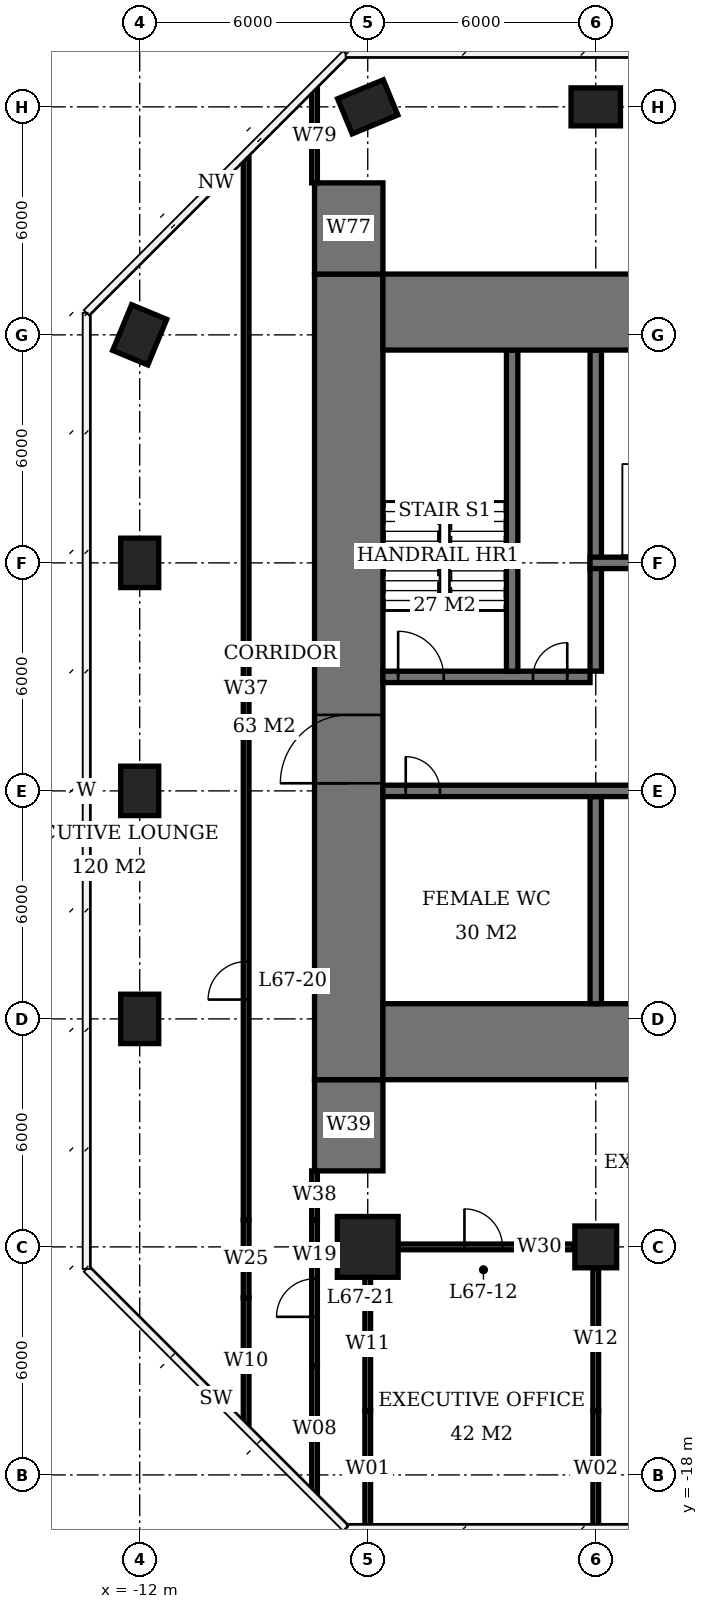
"""IFC4 building model, lengths in metres.
Left out: names, types, materials, properties, quantities, classifications, styles, units other than length and angle.
Written with IfcOpenShell. Run it as: python <this file> out.ifc"""

import sys

from ifc_helpers import new_model, si_unit, direction, frame, frame_2d, origin, origin_2d, place, context, subcontext, project, spatial, rectangle, extrude, element, fill, save


model = new_model("IFC4")
c1 = context("Model", 3, precision=1e-05, world=origin(), true_north=direction((0.0, 1.0)))
c2 = subcontext(c1, "Body", "Model", "MODEL_VIEW")
j1 = project(units=[si_unit("LENGTHUNIT", "METRE"), si_unit("PLANEANGLEUNIT", "RADIAN")], contexts=[c1])
p1 = place(None, origin())
s1 = spatial("IfcSite", under=j1, at=p1, CompositionType="ELEMENT")
p2 = place(p1, origin())
s2 = spatial("IfcBuilding", under=s1, at=p2, CompositionType="ELEMENT")
p3 = place(p2, frame((0.0, 0.0, 272.3)))
s3 = spatial("IfcBuildingStorey", under=s2, at=p3, CompositionType="ELEMENT", Elevation=272.3)
for number, where, z_axis, x_axis in (
    (1, (-12.0, -6.0, 0.0), (0.0, 0.0, 1.0), (0.0, 1.0, 0.0)),
    (2, (-12.0, 0.0, 0.0), (0.0, 0.0, 1.0), (0.0, 1.0, 0.0)),
    (3, (-12.0, 6.0, 0.0), (0.0, 0.0, 1.0), (0.0, 1.0, 0.0)),
    (4, (-12.0, 12.0, 0.0), (0.0, 0.0, 1.0), (0.383, 0.924, 0.0)),
):
    element("IfcColumn", number, at=place(p3, frame(where, z_axis=z_axis, x_axis=x_axis)), inside=s3, PredefinedType="COLUMN", context=c2, shape_type="SweptSolid", body=[
        extrude(rectangle(XDim=1.3, YDim=1.0, at=origin_2d()), origin(), (0.0, 0.0, 1.0), 3.9),
    ])
p4 = place(p3, frame((-6.0, -12.0, 0.0), z_axis=(0.0, 0.0, 1.0), x_axis=(1.0, 0.0, 0.0)))
e5 = element("IfcColumn", 5, at=p4, inside=s3, PredefinedType="COLUMN", context=c2, shape_type="SweptSolid", body=[
    extrude(rectangle(XDim=1.6, YDim=1.6, at=origin_2d()), origin(), (0.0, 0.0, 1.0), 3.9),
])
p5 = place(p3, frame((-6.0, 18.0, 0.0), z_axis=(0.0, 0.0, 1.0), x_axis=(0.923879532511, 0.382683432365, 0.0)))
e6 = element("IfcColumn", 6, at=p5, inside=s3, PredefinedType="COLUMN", context=c2, shape_type="SweptSolid", body=[
    extrude(rectangle(XDim=1.3, YDim=1.0, at=origin_2d()), origin(), (0.0, 0.0, 1.0), 3.9),
])
p6 = place(p3, frame((0.0, -12.0, 0.0), z_axis=(0.0, 0.0, 1.0), x_axis=(1.0, 0.0, 0.0)))
e7 = element("IfcColumn", 7, at=p6, inside=s3, PredefinedType="COLUMN", context=c2, shape_type="SweptSolid", body=[
    extrude(rectangle(XDim=1.1, YDim=1.1, at=origin_2d()), origin(), (0.0, 0.0, 1.0), 3.9),
])
p7 = place(p3, frame((0.0, 18.0, 0.0), z_axis=(0.0, 0.0, 1.0), x_axis=(1.0, 0.0, 0.0)))
e8 = element("IfcColumn", 8, at=p7, inside=s3, PredefinedType="COLUMN", context=c2, shape_type="SweptSolid", body=[
    extrude(rectangle(XDim=1.3, YDim=1.0, at=origin_2d()), origin(), (0.0, 0.0, 1.0), 3.9),
])
for number, where, z_axis, x_axis in (
    (9, (-5.6, -6.6, 0.0), (0.0, 0.0, 1.0), (1.0, 0.0, 0.0)),
    (10, (-5.6, 12.6, 0.0), (0.0, 0.0, 1.0), (1.0, 0.0, 0.0)),
):
    element("IfcWall", number, at=place(p3, frame(where, z_axis=z_axis, x_axis=x_axis)), inside=s3, PredefinedType="SHEAR", context=c2, shape_type="SweptSolid", body=[
        extrude(rectangle(XDim=23.2, YDim=2.0, at=frame_2d((11.6, 0.0))), origin(), (0.0, 0.0, 1.0), 3.9),
    ])
p8 = place(p3, frame((-6.5, -7.6, 0.0), z_axis=(0.0, 0.0, 1.0), x_axis=(0.0, 1.0, 0.0)))
e11 = element("IfcWall", 11, at=p8, inside=s3, PredefinedType="SHEAR", context=c2, shape_type="SweptSolid", body=[
    extrude(rectangle(XDim=21.2, YDim=1.8, at=frame_2d((10.6, 0.0))), origin(), (0.0, 0.0, 1.0), 3.9),
])
p9 = place(p8, frame((7.8, 0.0, 0.0)))
e12 = element("IfcOpeningElement", 12, at=p9, cuts=e11, PredefinedType="OPENING", context=c2, shape_type="SweptSolid", body=[
    extrude(rectangle(XDim=1.8, YDim=2.4, at=frame_2d((0.9, 1.2))), frame((0.0, 0.91, 0.0), z_axis=(0.0, -1.0, 0.0), x_axis=(1.0, 0.0, 0.0)), (0.0, 0.0, 1.0), 1.82),
])
for number, where, z_axis, x_axis in (
    (13, (-6.5, -10.0, 0.0), (0.0, 0.0, 1.0), (0.0, 1.0, 0.0)),
    (14, (-6.5, 13.6, 0.0), (0.0, 0.0, 1.0), (0.0, 1.0, 0.0)),
):
    element("IfcWall", number, at=place(p3, frame(where, z_axis=z_axis, x_axis=x_axis)), inside=s3, PredefinedType="SHEAR", context=c2, shape_type="SweptSolid", body=[
        extrude(rectangle(XDim=2.4, YDim=1.8, at=frame_2d((1.2, 0.0))), origin(), (0.0, 0.0, 1.0), 3.9),
    ])
p10 = place(p3, frame((-5.6, 0.0, 0.0), z_axis=(0.0, 0.0, 1.0), x_axis=(1.0, 0.0, 0.0)))
e15 = element("IfcWall", 15, at=p10, inside=s3, PredefinedType="SHEAR", context=c2, shape_type="SweptSolid", body=[
    extrude(rectangle(XDim=17.75, YDim=0.3, at=frame_2d((8.875, 0.0))), origin(), (0.0, 0.0, 1.0), 3.9),
])
p11 = place(p10, frame((0.6, 0.0, 0.0)))
e16 = element("IfcOpeningElement", 16, at=p11, cuts=e15, PredefinedType="OPENING", context=c2, shape_type="SweptSolid", body=[
    extrude(rectangle(XDim=0.9, YDim=2.1, at=frame_2d((0.45, 1.05))), frame((0.0, 0.16, 0.0), z_axis=(0.0, -1.0, 0.0), x_axis=(1.0, 0.0, 0.0)), (0.0, 0.0, 1.0), 0.32),
])
p12 = place(p10, frame((9.6, 0.0, 0.0)))
e17 = element("IfcOpeningElement", 17, at=p12, cuts=e15, PredefinedType="OPENING", context=c2, shape_type="SweptSolid", body=[
    extrude(rectangle(XDim=1.0, YDim=2.1, at=frame_2d((0.5, 1.05))), frame((0.0, 0.16, 0.0), z_axis=(0.0, -1.0, 0.0), x_axis=(1.0, 0.0, 0.0)), (0.0, 0.0, 1.0), 0.32),
])
p13 = place(p10, frame((12.55, 0.0, 0.0)))
e18 = element("IfcOpeningElement", 18, at=p13, cuts=e15, PredefinedType="OPENING", context=c2, shape_type="SweptSolid", body=[
    extrude(rectangle(XDim=1.1, YDim=2.1, at=frame_2d((0.55, 1.05))), frame((0.0, 0.16, 0.0), z_axis=(0.0, -1.0, 0.0), x_axis=(1.0, 0.0, 0.0)), (0.0, 0.0, 1.0), 0.32),
])
p14 = place(p10, frame((15.55, 0.0, 0.0)))
e19 = element("IfcOpeningElement", 19, at=p14, cuts=e15, PredefinedType="OPENING", context=c2, shape_type="SweptSolid", body=[
    extrude(rectangle(XDim=1.1, YDim=2.1, at=frame_2d((0.55, 1.05))), frame((0.0, 0.16, 0.0), z_axis=(0.0, -1.0, 0.0), x_axis=(1.0, 0.0, 0.0)), (0.0, 0.0, 1.0), 0.32),
])
p15 = place(p3, frame((-5.6, 3.0, 0.0), z_axis=(0.0, 0.0, 1.0), x_axis=(1.0, 0.0, 0.0)))
e20 = element("IfcWall", 20, at=p15, inside=s3, PredefinedType="SHEAR", context=c2, shape_type="SweptSolid", body=[
    extrude(rectangle(XDim=5.45, YDim=0.3, at=frame_2d((2.725, 0.0))), origin(), (0.0, 0.0, 1.0), 3.9),
])
p16 = place(p15, frame((0.4, 0.0, 0.0)))
e21 = element("IfcOpeningElement", 21, at=p16, cuts=e20, PredefinedType="OPENING", context=c2, shape_type="SweptSolid", body=[
    extrude(rectangle(XDim=1.2, YDim=2.1, at=frame_2d((0.6, 1.05))), frame((0.0, 0.16, 0.0), z_axis=(0.0, -1.0, 0.0), x_axis=(1.0, 0.0, 0.0)), (0.0, 0.0, 1.0), 0.32),
])
p17 = place(p15, frame((3.95, 0.0, 0.0)))
e22 = element("IfcOpeningElement", 22, at=p17, cuts=e20, PredefinedType="OPENING", context=c2, shape_type="SweptSolid", body=[
    extrude(rectangle(XDim=0.9, YDim=2.1, at=frame_2d((0.45, 1.05))), frame((0.0, 0.16, 0.0), z_axis=(0.0, -1.0, 0.0), x_axis=(1.0, 0.0, 0.0)), (0.0, 0.0, 1.0), 0.32),
])
p18 = place(p3, frame((-0.15, 6.0, 0.0), z_axis=(0.0, 0.0, 1.0), x_axis=(1.0, 0.0, 0.0)))
e23 = element("IfcWall", 23, at=p18, inside=s3, PredefinedType="SHEAR", context=c2, shape_type="SweptSolid", body=[
    extrude(rectangle(XDim=17.75, YDim=0.3, at=frame_2d((8.875, 0.0))), origin(), (0.0, 0.0, 1.0), 3.9),
])
p19 = place(p18, frame((13.15, 0.0, 0.0)))
e24 = element("IfcOpeningElement", 24, at=p19, cuts=e23, PredefinedType="OPENING", context=c2, shape_type="SweptSolid", body=[
    extrude(rectangle(XDim=0.9, YDim=2.1, at=frame_2d((0.45, 1.05))), frame((0.0, 0.16, 0.0), z_axis=(0.0, -1.0, 0.0), x_axis=(1.0, 0.0, 0.0)), (0.0, 0.0, 1.0), 0.32),
])
p20 = place(p18, frame((16.25, 0.0, 0.0)))
e25 = element("IfcOpeningElement", 25, at=p20, cuts=e23, PredefinedType="OPENING", context=c2, shape_type="SweptSolid", body=[
    extrude(rectangle(XDim=1.0, YDim=2.1, at=frame_2d((0.5, 1.05))), frame((0.0, 0.16, 0.0), z_axis=(0.0, -1.0, 0.0), x_axis=(1.0, 0.0, 0.0)), (0.0, 0.0, 1.0), 0.32),
])
p21 = place(p18, frame((1.1, 0.0, 0.0)))
e26 = element("IfcOpeningElement", 26, at=p21, cuts=e23, PredefinedType="OPENING", context=c2, shape_type="SweptSolid", body=[
    extrude(rectangle(XDim=1.1, YDim=2.1, at=frame_2d((0.55, 1.05))), frame((0.0, 0.16, 0.0), z_axis=(0.0, -1.0, 0.0), x_axis=(1.0, 0.0, 0.0)), (0.0, 0.0, 1.0), 0.32),
])
p22 = place(p18, frame((4.1, 0.0, 0.0)))
e27 = element("IfcOpeningElement", 27, at=p22, cuts=e23, PredefinedType="OPENING", context=c2, shape_type="SweptSolid", body=[
    extrude(rectangle(XDim=1.1, YDim=2.1, at=frame_2d((0.55, 1.05))), frame((0.0, 0.16, 0.0), z_axis=(0.0, -1.0, 0.0), x_axis=(1.0, 0.0, 0.0)), (0.0, 0.0, 1.0), 0.32),
])
p23 = place(p3, frame((0.0, -5.6, 0.0), z_axis=(0.0, 0.0, 1.0), x_axis=(0.0, 1.0, 0.0)))
e28 = element("IfcWall", 28, at=p23, inside=s3, PredefinedType="SHEAR", context=c2, shape_type="SweptSolid", body=[
    extrude(rectangle(XDim=5.45, YDim=0.3, at=frame_2d((2.725, 0.0))), origin(), (0.0, 0.0, 1.0), 3.9),
])
for number, where, z_axis, x_axis in (
    (29, (0.0, 3.15, 0.0), (0.0, 0.0, 1.0), (0.0, 1.0, 0.0)),
    (30, (-2.2, 3.15, 0.0), (0.0, 0.0, 1.0), (0.0, 1.0, 0.0)),
):
    element("IfcWall", number, at=place(p3, frame(where, z_axis=z_axis, x_axis=x_axis)), inside=s3, PredefinedType="SHEAR", context=c2, shape_type="SweptSolid", body=[
        extrude(rectangle(XDim=8.45, YDim=0.3, at=frame_2d((4.225, 0.0))), origin(), (0.0, 0.0, 1.0), 3.9),
    ])
p24 = place(p3, frame((-5.2, -12.0, 0.0), z_axis=(0.0, 0.0, 1.0), x_axis=(1.0, 0.0, 0.0)))
e31 = element("IfcWall", 31, at=p24, inside=s3, PredefinedType="PARTITIONING", context=c2, shape_type="SweptSolid", body=[
    extrude(rectangle(XDim=4.64, YDim=0.15, at=frame_2d((2.32, 0.0))), origin(), (0.0, 0.0, 1.0), 3.65),
])
p25 = place(p24, frame((1.745, 0.0, 0.0)))
e32 = element("IfcOpeningElement", 32, at=p25, cuts=e31, PredefinedType="OPENING", context=c2, shape_type="SweptSolid", body=[
    extrude(rectangle(XDim=1.0, YDim=2.4, at=frame_2d((0.5, 1.2))), frame((0.0, 0.085, 0.0), z_axis=(0.0, -1.0, 0.0), x_axis=(1.0, 0.0, 0.0)), (0.0, 0.0, 1.0), 0.17),
])
p26 = place(p3, frame((-6.0, -19.375, 0.0), z_axis=(0.0, 0.0, 1.0), x_axis=(0.0, 1.0, 0.0)))
e33 = element("IfcWall", 33, at=p26, inside=s3, PredefinedType="PARTITIONING", context=c2, shape_type="SweptSolid", body=[
    extrude(rectangle(XDim=3.065, YDim=0.15, at=frame_2d((1.532, 0.0))), origin(), (0.0, 0.0, 1.0), 3.65),
])
p27 = place(p3, frame((-6.0, -16.31, 0.0), z_axis=(0.0, 0.0, 1.0), x_axis=(0.0, 1.0, 0.0)))
e34 = element("IfcWall", 34, at=p27, inside=s3, PredefinedType="PARTITIONING", context=c2, shape_type="SweptSolid", body=[
    extrude(rectangle(XDim=3.51, YDim=0.15, at=frame_2d((1.755, 0.0))), origin(), (0.0, 0.0, 1.0), 2.65),
])
p28 = place(p3, frame((0.0, -19.375, 0.0), z_axis=(0.0, 0.0, 1.0), x_axis=(0.0, 1.0, 0.0)))
e35 = element("IfcWall", 35, at=p28, inside=s3, PredefinedType="PARTITIONING", context=c2, shape_type="SweptSolid", body=[
    extrude(rectangle(XDim=3.065, YDim=0.15, at=frame_2d((1.532, 0.0))), origin(), (0.0, 0.0, 1.0), 3.65),
])
p29 = place(p3, frame((0.0, -16.31, 0.0), z_axis=(0.0, 0.0, 1.0), x_axis=(0.0, 1.0, 0.0)))
e36 = element("IfcWall", 36, at=p29, inside=s3, PredefinedType="PARTITIONING", context=c2, shape_type="SweptSolid", body=[
    extrude(rectangle(XDim=3.76, YDim=0.15, at=frame_2d((1.88, 0.0))), origin(), (0.0, 0.0, 1.0), 2.65),
])
p30 = place(p3, frame((-9.2, -16.664, 0.0), z_axis=(0.0, 0.0, 1.0), x_axis=(0.0, 1.0, 0.0)))
e37 = element("IfcWall", 37, at=p30, inside=s3, PredefinedType="PARTITIONING", context=c2, shape_type="SweptSolid", body=[
    extrude(rectangle(XDim=3.324, YDim=0.15, at=frame_2d((1.662, 0.0))), origin(), (0.0, 0.0, 1.0), 3.65),
])
p31 = place(p3, frame((-9.2, -13.34, 0.0), z_axis=(0.0, 0.0, 1.0), x_axis=(0.0, 1.0, 0.0)))
e38 = element("IfcWall", 38, at=p31, inside=s3, PredefinedType="PARTITIONING", context=c2, shape_type="SweptSolid", body=[
    extrude(rectangle(XDim=2.05, YDim=0.15, at=frame_2d((1.025, 0.0))), origin(), (0.0, 0.0, 1.0), 2.65),
])
p32 = place(p3, frame((-9.2, -11.29, 0.0), z_axis=(0.0, 0.0, 1.0), x_axis=(0.0, 1.0, 0.0)))
e39 = element("IfcWall", 39, at=p32, inside=s3, PredefinedType="PARTITIONING", context=c2, shape_type="SweptSolid", body=[
    extrude(rectangle(XDim=27.954, YDim=0.15, at=frame_2d((13.977, 0.0))), origin(), (0.0, 0.0, 1.0), 3.65),
])
p33 = place(p32, frame((5.798, 0.0, 0.0)))
e40 = element("IfcOpeningElement", 40, at=p33, cuts=e39, PredefinedType="OPENING", context=c2, shape_type="SweptSolid", body=[
    extrude(rectangle(XDim=1.0, YDim=2.4, at=frame_2d((0.5, 1.2))), frame((0.0, 0.085, 0.0), z_axis=(0.0, -1.0, 0.0), x_axis=(1.0, 0.0, 0.0)), (0.0, 0.0, 1.0), 0.17),
])
p34 = place(p3, frame((-7.4, -18.464, 0.0), z_axis=(0.0, 0.0, 1.0), x_axis=(0.0, 1.0, 0.0)))
e41 = element("IfcWall", 41, at=p34, inside=s3, PredefinedType="PARTITIONING", context=c2, shape_type="SweptSolid", body=[
    extrude(rectangle(XDim=3.324, YDim=0.15, at=frame_2d((1.662, 0.0))), origin(), (0.0, 0.0, 1.0), 3.65),
])
p35 = place(p3, frame((-7.4, -15.14, 0.0), z_axis=(0.0, 0.0, 1.0), x_axis=(0.0, 1.0, 0.0)))
e42 = element("IfcWall", 42, at=p35, inside=s3, PredefinedType="PARTITIONING", context=c2, shape_type="SweptSolid", body=[
    extrude(rectangle(XDim=3.85, YDim=0.15, at=frame_2d((1.925, 0.0))), origin(), (0.0, 0.0, 1.0), 2.65),
])
p36 = place(p35, frame((1.3, 0.0, 0.0)))
e43 = element("IfcOpeningElement", 43, at=p36, cuts=e42, PredefinedType="OPENING", context=c2, shape_type="SweptSolid", body=[
    extrude(rectangle(XDim=1.0, YDim=2.1, at=frame_2d((0.5, 1.05))), frame((0.0, 0.085, 0.0), z_axis=(0.0, -1.0, 0.0), x_axis=(1.0, 0.0, 0.0)), (0.0, 0.0, 1.0), 0.17),
])
p37 = place(p3, frame((-7.4, -11.29, 0.0), z_axis=(0.0, 0.0, 1.0), x_axis=(0.0, 1.0, 0.0)))
e44 = element("IfcWall", 44, at=p37, inside=s3, PredefinedType="PARTITIONING", context=c2, shape_type="SweptSolid", body=[
    extrude(rectangle(XDim=1.29, YDim=0.15, at=frame_2d((0.645, 0.0))), origin(), (0.0, 0.0, 1.0), 3.65),
])
p38 = place(p3, frame((-7.4, 16.0, 0.0), z_axis=(0.0, 0.0, 1.0), x_axis=(0.0, 1.0, 0.0)))
e45 = element("IfcWall", 45, at=p38, inside=s3, PredefinedType="PARTITIONING", context=c2, shape_type="SweptSolid", body=[
    extrude(rectangle(XDim=2.464, YDim=0.15, at=frame_2d((1.232, 0.0))), origin(), (0.0, 0.0, 1.0), 3.65),
])
p39 = place(p9, origin())
e46 = element("IfcDoor", 46, at=p39, inside=s3, OperationType="DOUBLE_DOOR_SINGLE_SWING", PredefinedType="DOOR", context=c2, shape_type="SweptSolid", body=[
    extrude(rectangle(XDim=1.8, YDim=2.4, at=frame_2d((0.9, 1.2))), frame((0.0, 0.025, 0.0), z_axis=(0.0, -1.0, 0.0), x_axis=(1.0, 0.0, 0.0)), (0.0, 0.0, 1.0), 0.05),
])
fill(e12, e46)
p40 = place(p16, origin())
e47 = element("IfcDoor", 47, at=p40, inside=s3, OperationType="SINGLE_SWING_LEFT", PredefinedType="DOOR", context=c2, shape_type="SweptSolid", body=[
    extrude(rectangle(XDim=1.2, YDim=2.1, at=frame_2d((0.6, 1.05))), frame((0.0, 0.025, 0.0), z_axis=(0.0, -1.0, 0.0), x_axis=(1.0, 0.0, 0.0)), (0.0, 0.0, 1.0), 0.05),
])
fill(e21, e47)
p41 = place(p17, origin())
e48 = element("IfcDoor", 48, at=p41, inside=s3, OperationType="SINGLE_SWING_RIGHT", PredefinedType="DOOR", context=c2, shape_type="SweptSolid", body=[
    extrude(rectangle(XDim=0.9, YDim=2.1, at=frame_2d((0.45, 1.05))), frame((0.0, 0.025, 0.0), z_axis=(0.0, -1.0, 0.0), x_axis=(1.0, 0.0, 0.0)), (0.0, 0.0, 1.0), 0.05),
])
fill(e22, e48)
p42 = place(p11, origin())
e49 = element("IfcDoor", 49, at=p42, inside=s3, OperationType="SINGLE_SWING_LEFT", PredefinedType="DOOR", context=c2, shape_type="SweptSolid", body=[
    extrude(rectangle(XDim=0.9, YDim=2.1, at=frame_2d((0.45, 1.05))), frame((0.0, 0.025, 0.0), z_axis=(0.0, -1.0, 0.0), x_axis=(1.0, 0.0, 0.0)), (0.0, 0.0, 1.0), 0.05),
])
fill(e16, e49)
p43 = place(p25, origin())
e50 = element("IfcDoor", 50, at=p43, inside=s3, OperationType="SINGLE_SWING_LEFT", PredefinedType="DOOR", context=c2, shape_type="SweptSolid", body=[
    extrude(rectangle(XDim=1.0, YDim=2.4, at=frame_2d((0.5, 1.2))), frame((0.0, 0.025, 0.0), z_axis=(0.0, -1.0, 0.0), x_axis=(1.0, 0.0, 0.0)), (0.0, 0.0, 1.0), 0.05),
])
fill(e32, e50)
p44 = place(p33, origin())
e51 = element("IfcDoor", 51, at=p44, inside=s3, OperationType="SINGLE_SWING_LEFT", PredefinedType="DOOR", context=c2, shape_type="SweptSolid", body=[
    extrude(rectangle(XDim=1.0, YDim=2.4, at=frame_2d((0.5, 1.2))), frame((0.0, 0.025, 0.0), z_axis=(0.0, -1.0, 0.0), x_axis=(1.0, 0.0, 0.0)), (0.0, 0.0, 1.0), 0.05),
])
fill(e40, e51)
p45 = place(p36, origin())
e52 = element("IfcDoor", 52, at=p45, inside=s3, OperationType="SINGLE_SWING_LEFT", PredefinedType="DOOR", context=c2, shape_type="SweptSolid", body=[
    extrude(rectangle(XDim=1.0, YDim=2.1, at=frame_2d((0.5, 1.05))), frame((0.0, 0.025, 0.0), z_axis=(0.0, -1.0, 0.0), x_axis=(1.0, 0.0, 0.0)), (0.0, 0.0, 1.0), 0.05),
])
fill(e43, e52)
save(model, sys.argv[1])
